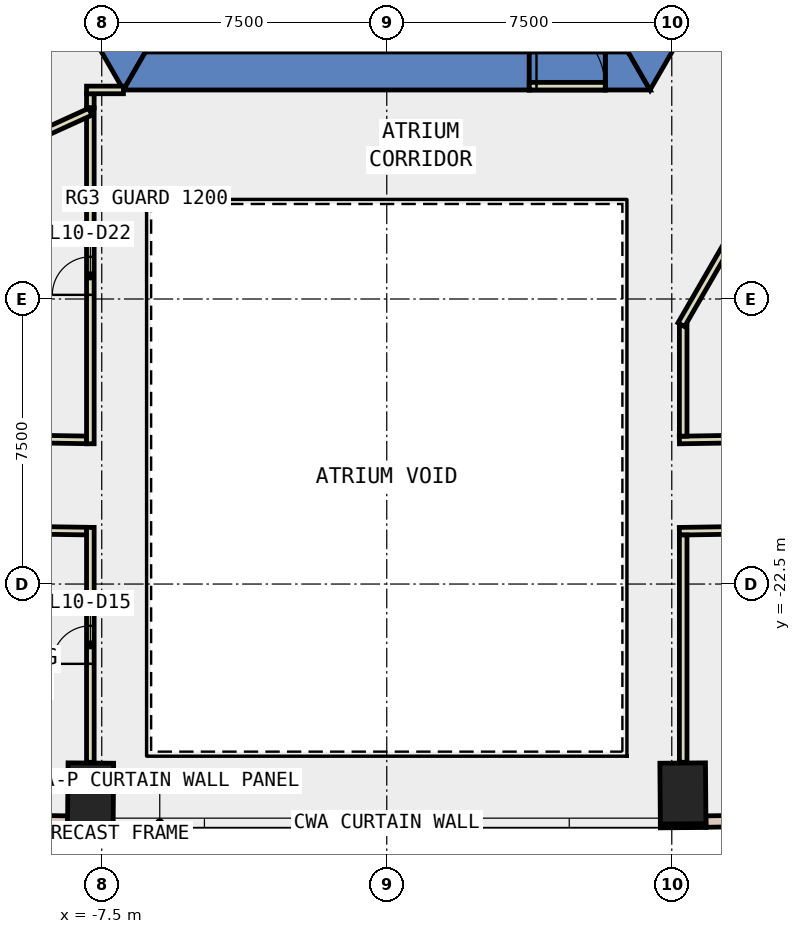
"""IFC4 building model, lengths in metres.
Left out: names, types, materials, properties, quantities, classifications, styles, units other than length and angle.
Written with IfcOpenShell. Run it as: python <this file> out.ifc"""

import sys

from ifc_helpers import new_model, si_unit, direction, frame, frame_2d, origin, origin_2d, place, context, subcontext, project, spatial, polyline, rectangle, outline, extrude, element, fill, save


model = new_model("IFC4")
c1 = context("Model", 3, precision=1e-05, world=origin(), true_north=direction((0.0, 1.0)))
c2 = subcontext(c1, "Body", "Model", "MODEL_VIEW")
j1 = project(units=[si_unit("LENGTHUNIT", "METRE"), si_unit("PLANEANGLEUNIT", "RADIAN")], contexts=[c1])
p1 = place(None, origin())
s1 = spatial("IfcSite", under=j1, at=p1, CompositionType="ELEMENT")
p2 = place(p1, origin())
s2 = spatial("IfcBuilding", under=s1, at=p2, CompositionType="ELEMENT")
p3 = place(p2, frame((0.0, 0.0, 51.8)))
s3 = spatial("IfcBuildingStorey", under=s2, at=p3, CompositionType="ELEMENT", Elevation=51.8)
for number, where, z_axis, x_axis in (
    (1, (-7.793, -28.01, -0.4), (0.0, 0.0, 1.0), (-1.0, 0.008, 0.0)),
    (2, (7.793, -28.01, -0.4), (0.0, 0.0, 1.0), (1.0, 0.008, 0.0)),
):
    element("IfcColumn", number, at=place(p3, frame(where, z_axis=z_axis, x_axis=x_axis)), inside=s3, PredefinedType="COLUMN", context=c2, shape_type="SweptSolid", body=[
        extrude(rectangle(XDim=1.2, YDim=1.6, at=origin_2d()), origin(), (0.0, 0.0, 1.0), 4.2),
    ])
p4 = place(p3, frame((0.0, 0.0, -0.4)))
e3 = element("IfcWall", 3, at=p4, inside=s3, PredefinedType="SHEAR", context=c2, shape_type="SweptSolid", body=[
    extrude(outline(polyline([(-13.856, 2.5), (-6.928, -9.5), (-6.351, -8.5), (-12.702, 2.5), (-13.856, 2.5)])), origin(), (0.0, 0.0, 1.0), 4.2),
])
p5 = place(p3, frame((0.0, 0.0, -0.4)))
e4 = element("IfcWall", 4, at=p5, inside=s3, PredefinedType="SHEAR", context=c2, shape_type="SweptSolid", body=[
    extrude(outline(polyline([(3.75, -9.5), (3.75, -8.5), (-6.351, -8.5), (-6.928, -9.5), (3.75, -9.5)])), origin(), (0.0, 0.0, 1.0), 4.2),
])
p6 = place(p3, frame((0.0, 0.0, -0.4)))
e5 = element("IfcWall", 5, at=p6, inside=s3, PredefinedType="SHEAR", context=c2, shape_type="SweptSolid", body=[
    extrude(outline(polyline([(5.75, -8.5), (5.75, -9.5), (6.928, -9.5), (6.351, -8.5), (5.75, -8.5)])), origin(), (0.0, 0.0, 1.0), 4.2),
])
p7 = place(p3, frame((0.0, 0.0, 3.6)))
e6 = element("IfcWall", 6, at=p7, inside=s3, PredefinedType="SHEAR", context=c2, shape_type="SweptSolid", body=[
    extrude(outline(polyline([(5.75, -9.5), (5.75, -8.5), (3.75, -8.5), (3.75, -9.5), (5.75, -9.5)])), origin(), (0.0, 0.0, 1.0), 0.2),
])
p8 = place(p3, frame((0.0, 0.0, -0.4)))
e7 = element("IfcWall", 7, at=p8, inside=s3, PredefinedType="SHEAR", context=c2, shape_type="SweptSolid", body=[
    extrude(outline(polyline([(8.117, -7.44), (7.252, -6.94), (6.351, -8.5), (6.928, -9.5), (8.117, -7.44)])), origin(), (0.0, 0.0, 1.0), 4.2),
])
for number, where, z_axis, x_axis in (
    (8, (-8.4, -28.855, 0.0), (0.0, 0.0, 1.0), (1.0, -0.008, 0.0)),
    (9, (7.2, -28.865, 0.0), (0.0, 0.0, 1.0), (1.0, 0.008, 0.0)),
):
    element("IfcWall", number, at=place(p3, frame(where, z_axis=z_axis, x_axis=x_axis)), inside=s3, PredefinedType="STANDARD", context=c2, shape_type="SweptSolid", body=[
        extrude(rectangle(XDim=1.2, YDim=0.1, at=frame_2d((0.6, 0.0))), origin(), (0.0, 0.0, 1.0), 3.8),
    ])
p9 = place(p3, frame((-15.568, -28.637, 0.0), z_axis=(0.0, 0.0, 1.0), x_axis=(0.999875756772, -0.015762963512, 0.0)))
e10 = element("IfcWall", 10, at=p9, inside=s3, PredefinedType="STANDARD", context=c2, shape_type="SweptSolid", body=[
    extrude(rectangle(XDim=7.171, YDim=0.3, at=frame_2d((3.585, 0.0))), origin(), (0.0, 0.0, 1.0), 3.8),
])
p10 = place(p9, frame((0.593, 0.0, 0.9)))
e11 = element("IfcOpeningElement", 11, at=p10, cuts=e10, PredefinedType="OPENING", context=c2, shape_type="SweptSolid", body=[
    extrude(rectangle(XDim=2.4, YDim=2.6, at=frame_2d((1.2, 1.3))), frame((0.0, 0.16, 0.0), z_axis=(0.0, -1.0, 0.0), x_axis=(1.0, 0.0, 0.0)), (0.0, 0.0, 1.0), 0.32),
])
p11 = place(p9, frame((4.178, 0.0, 0.9)))
e12 = element("IfcOpeningElement", 12, at=p11, cuts=e10, PredefinedType="OPENING", context=c2, shape_type="SweptSolid", body=[
    extrude(rectangle(XDim=2.4, YDim=2.6, at=frame_2d((1.2, 1.3))), frame((0.0, 0.16, 0.0), z_axis=(0.0, -1.0, 0.0), x_axis=(1.0, 0.0, 0.0)), (0.0, 0.0, 1.0), 0.32),
])
p12 = place(p3, frame((8.398, -28.75, 0.0), z_axis=(0.0, 0.0, 1.0), x_axis=(0.999875756772, 0.015762963512, 0.0)))
e13 = element("IfcWall", 13, at=p12, inside=s3, PredefinedType="STANDARD", context=c2, shape_type="SweptSolid", body=[
    extrude(rectangle(XDim=7.171, YDim=0.3, at=frame_2d((3.585, 0.0))), origin(), (0.0, 0.0, 1.0), 3.8),
])
p13 = place(p12, frame((0.593, 0.0, 0.9)))
e14 = element("IfcOpeningElement", 14, at=p13, cuts=e13, PredefinedType="OPENING", context=c2, shape_type="SweptSolid", body=[
    extrude(rectangle(XDim=2.4, YDim=2.6, at=frame_2d((1.2, 1.3))), frame((0.0, 0.16, 0.0), z_axis=(0.0, -1.0, 0.0), x_axis=(1.0, 0.0, 0.0)), (0.0, 0.0, 1.0), 0.32),
])
p14 = place(p12, frame((4.178, 0.0, 0.9)))
e15 = element("IfcOpeningElement", 15, at=p14, cuts=e13, PredefinedType="OPENING", context=c2, shape_type="SweptSolid", body=[
    extrude(rectangle(XDim=2.4, YDim=2.6, at=frame_2d((1.2, 1.3))), frame((0.0, 0.16, 0.0), z_axis=(0.0, -1.0, 0.0), x_axis=(1.0, 0.0, 0.0)), (0.0, 0.0, 1.0), 0.32),
])
p15 = place(p3, frame((7.7, -18.71, 0.0), z_axis=(0.0, 0.0, 1.0), x_axis=(0.999874256061, 0.015857870791, 0.0)))
e16 = element("IfcWall", 16, at=p15, inside=s3, PredefinedType="PARTITIONING", context=c2, shape_type="SweptSolid", body=[
    extrude(rectangle(XDim=8.252, YDim=0.2, at=frame_2d((4.126, 0.0))), origin(), (0.0, 0.0, 1.0), 3.8),
])
p16 = place(p3, frame((-11.477, -18.65, 0.0), z_axis=(0.0, 0.0, 1.0), x_axis=(0.9998724957, -0.015968479661, 0.0)))
e17 = element("IfcWall", 17, at=p16, inside=s3, PredefinedType="PARTITIONING", context=c2, shape_type="SweptSolid", body=[
    extrude(rectangle(XDim=3.578, YDim=0.2, at=frame_2d((1.789, 0.0))), origin(), (0.0, 0.0, 1.0), 3.8),
])
p17 = place(p3, frame((16.078, -20.978, 0.0), z_axis=(0.0, 0.0, 1.0), x_axis=(-0.999873907997, -0.015879801838, 0.0)))
e18 = element("IfcWall", 18, at=p17, inside=s3, PredefinedType="PARTITIONING", context=c2, shape_type="SweptSolid", body=[
    extrude(rectangle(XDim=8.379, YDim=0.2, at=frame_2d((4.189, 0.0))), origin(), (0.0, 0.0, 1.0), 3.8),
])
p18 = place(p17, frame((3.689, 0.0, 0.0)))
e19 = element("IfcOpeningElement", 19, at=p18, cuts=e18, PredefinedType="OPENING", context=c2, shape_type="SweptSolid", body=[
    extrude(rectangle(XDim=1.0, YDim=2.1, at=frame_2d((0.5, 1.05))), frame((0.0, 0.11, 0.0), z_axis=(0.0, -1.0, 0.0), x_axis=(1.0, 0.0, 0.0)), (0.0, 0.0, 1.0), 0.22),
])
p19 = place(p3, frame((-7.9, -21.107, 0.0), z_axis=(0.0, 0.0, 1.0), x_axis=(-0.999876676102, 0.015704540367, 0.0)))
e20 = element("IfcWall", 20, at=p19, inside=s3, PredefinedType="PARTITIONING", context=c2, shape_type="SweptSolid", body=[
    extrude(rectangle(XDim=3.886, YDim=0.2, at=frame_2d((1.943, 0.0))), origin(), (0.0, 0.0, 1.0), 3.8),
])
p20 = place(p3, frame((7.8, -15.69, 0.0), z_axis=(0.0, 0.0, 1.0), x_axis=(0.0, -1.0, 0.0)))
e21 = element("IfcWall", 21, at=p20, inside=s3, PredefinedType="PARTITIONING", context=c2, shape_type="SweptSolid", body=[
    extrude(rectangle(XDim=2.919, YDim=0.2, at=frame_2d((1.459, 0.0))), origin(), (0.0, 0.0, 1.0), 3.8),
])
p21 = place(p3, frame((-7.8, -9.972, 0.0), z_axis=(0.0, 0.0, 1.0), x_axis=(0.0, 1.0, 0.0)))
e22 = element("IfcWall", 22, at=p21, inside=s3, PredefinedType="PARTITIONING", context=c2, shape_type="SweptSolid", body=[
    extrude(rectangle(XDim=0.373, YDim=0.2, at=frame_2d((0.187, 0.0))), origin(), (0.0, 0.0, 1.0), 3.8),
])
p22 = place(p3, frame((-7.9, -9.499, 0.0), z_axis=(0.0, 0.0, 1.0), x_axis=(1.0, 0.0, 0.0)))
e23 = element("IfcWall", 23, at=p22, inside=s3, PredefinedType="PARTITIONING", context=c2, shape_type="SweptSolid", body=[
    extrude(rectangle(XDim=0.971, YDim=0.2, at=frame_2d((0.485, 0.0))), origin(), (0.0, 0.0, 1.0), 3.8),
])
p23 = place(p3, frame((-7.8, -18.809, 0.0), z_axis=(0.0, 0.0, 1.0), x_axis=(0.0, 1.0, 0.0)))
e24 = element("IfcWall", 24, at=p23, inside=s3, PredefinedType="PARTITIONING", context=c2, shape_type="SweptSolid", body=[
    extrude(rectangle(XDim=8.837, YDim=0.2, at=frame_2d((4.418, 0.0))), origin(), (0.0, 0.0, 1.0), 3.8),
])
p24 = place(p23, frame((3.918, 0.0, 0.0)))
e25 = element("IfcOpeningElement", 25, at=p24, cuts=e24, PredefinedType="OPENING", context=c2, shape_type="SweptSolid", body=[
    extrude(rectangle(XDim=1.0, YDim=2.1, at=frame_2d((0.5, 1.05))), frame((0.0, 0.11, 0.0), z_axis=(0.0, -1.0, 0.0), x_axis=(1.0, 0.0, 0.0)), (0.0, 0.0, 1.0), 0.22),
])
p25 = place(p3, frame((7.8, -21.209, 0.0), z_axis=(0.0, 0.0, 1.0), x_axis=(0.0, -1.0, 0.0)))
e26 = element("IfcWall", 26, at=p25, inside=s3, PredefinedType="PARTITIONING", context=c2, shape_type="SweptSolid", body=[
    extrude(rectangle(XDim=5.981, YDim=0.2, at=frame_2d((2.99, 0.0))), origin(), (0.0, 0.0, 1.0), 3.8),
])
p26 = place(p3, frame((-7.8, -27.19, 0.0), z_axis=(0.0, 0.0, 1.0), x_axis=(0.0, 1.0, 0.0)))
e27 = element("IfcWall", 27, at=p26, inside=s3, PredefinedType="PARTITIONING", context=c2, shape_type="SweptSolid", body=[
    extrude(rectangle(XDim=6.181, YDim=0.2, at=frame_2d((3.09, 0.0))), origin(), (0.0, 0.0, 1.0), 3.8),
])
p27 = place(p26, frame((2.59, 0.0, 0.0)))
e28 = element("IfcOpeningElement", 28, at=p27, cuts=e27, PredefinedType="OPENING", context=c2, shape_type="SweptSolid", body=[
    extrude(rectangle(XDim=1.0, YDim=2.1, at=frame_2d((0.5, 1.05))), frame((0.0, 0.11, 0.0), z_axis=(0.0, -1.0, 0.0), x_axis=(1.0, 0.0, 0.0)), (0.0, 0.0, 1.0), 0.22),
])
p28 = place(p3, frame((-7.8, -10.072, 0.0), z_axis=(0.0, 0.0, 1.0), x_axis=(-0.910011899741, -0.414582129777, 0.0)))
e29 = element("IfcWall", 29, at=p28, inside=s3, PredefinedType="PARTITIONING", context=c2, shape_type="SweptSolid", body=[
    extrude(rectangle(XDim=7.694, YDim=0.2, at=frame_2d((3.847, 0.0))), origin(), (0.0, 0.0, 1.0), 3.8),
])
p29 = place(p3, frame((3.75, -9.4, 0.0), z_axis=(0.0, 0.0, 1.0), x_axis=(1.0, 0.0, 0.0)))
e30 = element("IfcWall", 30, at=p29, inside=s3, PredefinedType="PARTITIONING", context=c2, shape_type="SweptSolid", body=[
    extrude(rectangle(XDim=2.0, YDim=0.2, at=frame_2d((1.0, 0.0))), origin(), (0.0, 0.0, 1.0), 2.4),
])
p30 = place(p29, frame((0.19, 0.0, 0.0)))
e31 = element("IfcOpeningElement", 31, at=p30, cuts=e30, PredefinedType="OPENING", context=c2, shape_type="SweptSolid", body=[
    extrude(rectangle(XDim=1.8, YDim=2.1, at=frame_2d((0.9, 1.05))), frame((0.0, 0.11, 0.0), z_axis=(0.0, -1.0, 0.0), x_axis=(1.0, 0.0, 0.0)), (0.0, 0.0, 1.0), 0.22),
])
p31 = place(p3, frame((12.401, -7.621, 0.0), z_axis=(0.0, 0.0, 1.0), x_axis=(-0.499983724212, -0.866034800411, 0.0)))
e32 = element("IfcWall", 32, at=p31, inside=s3, PredefinedType="PARTITIONING", context=c2, shape_type="SweptSolid", body=[
    extrude(rectangle(XDim=9.302, YDim=0.2, at=frame_2d((4.651, 0.0))), origin(), (0.0, 0.0, 1.0), 3.8),
])
p32 = place(p27, origin())
e33 = element("IfcDoor", 33, at=p32, inside=s3, OperationType="SINGLE_SWING_LEFT", PredefinedType="DOOR", context=c2, shape_type="SweptSolid", body=[
    extrude(rectangle(XDim=1.0, YDim=2.1, at=frame_2d((0.5, 1.05))), frame((0.0, 0.025, 0.0), z_axis=(0.0, -1.0, 0.0), x_axis=(1.0, 0.0, 0.0)), (0.0, 0.0, 1.0), 0.05),
])
fill(e28, e33)
p33 = place(p24, origin())
e34 = element("IfcDoor", 34, at=p33, inside=s3, OperationType="SINGLE_SWING_RIGHT", PredefinedType="DOOR", context=c2, shape_type="SweptSolid", body=[
    extrude(rectangle(XDim=1.0, YDim=2.1, at=frame_2d((0.5, 1.05))), frame((0.0, 0.025, 0.0), z_axis=(0.0, -1.0, 0.0), x_axis=(1.0, 0.0, 0.0)), (0.0, 0.0, 1.0), 0.05),
])
fill(e25, e34)
p34 = place(p30, origin())
e35 = element("IfcDoor", 35, at=p34, inside=s3, OperationType="DOUBLE_DOOR_SINGLE_SWING", PredefinedType="DOOR", context=c2, shape_type="SweptSolid", body=[
    extrude(rectangle(XDim=1.8, YDim=2.1, at=frame_2d((0.9, 1.05))), frame((0.0, 0.025, 0.0), z_axis=(0.0, -1.0, 0.0), x_axis=(1.0, 0.0, 0.0)), (0.0, 0.0, 1.0), 0.05),
])
fill(e31, e35)
save(model, sys.argv[1])
